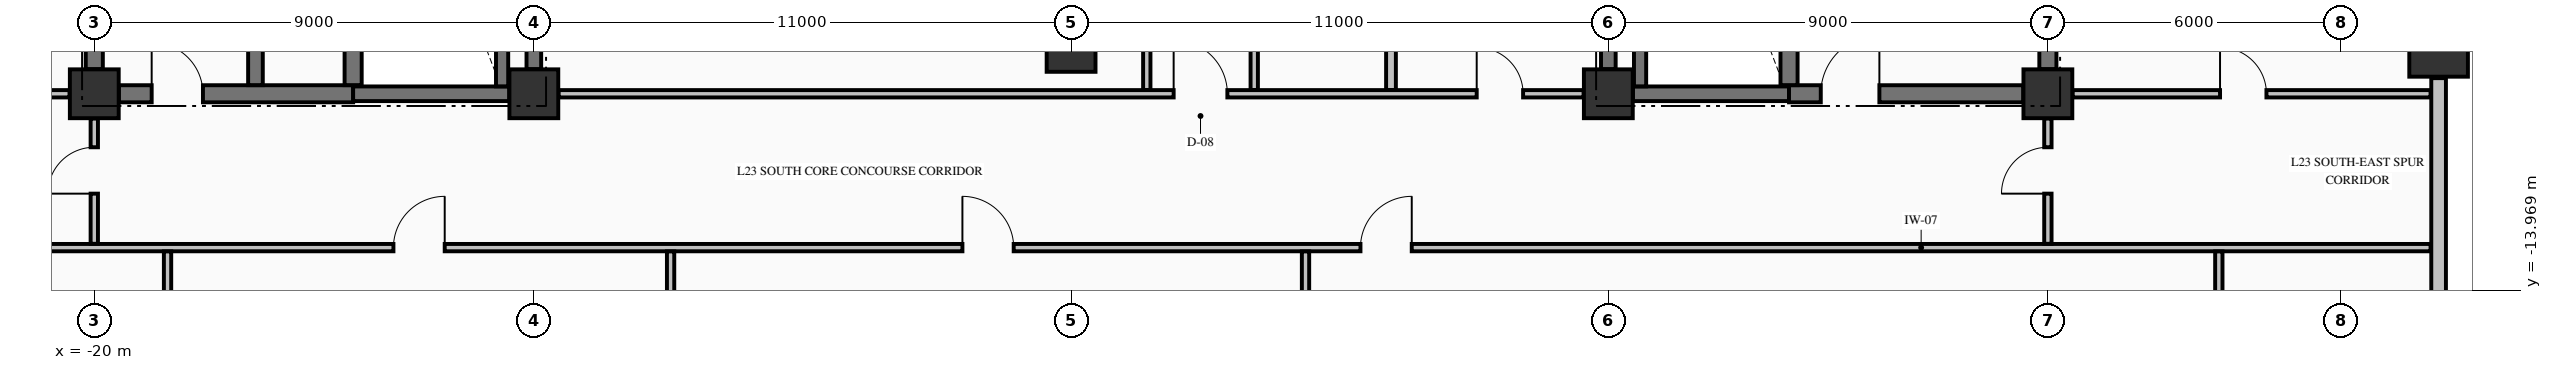
"""IFC4 building model, lengths in metres.
Left out: names, types, materials, properties, quantities, classifications, styles, units other than length and angle.
Written with IfcOpenShell. Run it as: python <this file> out.ifc"""

import sys

from ifc_helpers import new_model, si_unit, direction, frame, frame_2d, origin, origin_2d, place, context, subcontext, project, spatial, rectangle, extrude, element, fill, save


model = new_model("IFC4")
c1 = context("Model", 3, precision=1e-05, world=origin(), true_north=direction((0.0, 1.0)))
c2 = subcontext(c1, "Body", "Model", "MODEL_VIEW")
j1 = project(units=[si_unit("LENGTHUNIT", "METRE"), si_unit("PLANEANGLEUNIT", "RADIAN")], contexts=[c1])
p1 = place(None, origin())
s1 = spatial("IfcSite", under=j1, at=p1, CompositionType="ELEMENT")
p2 = place(p1, origin())
s2 = spatial("IfcBuilding", under=s1, at=p2, CompositionType="ELEMENT")
p3 = place(p2, frame((0.0, 0.0, 94.93)))
s3 = spatial("IfcBuildingStorey", under=s2, at=p3, CompositionType="ELEMENT", Elevation=94.93)
p4 = place(p3, frame((28.0, -9.0, -0.25), z_axis=(0.0, 0.0, 1.0), x_axis=(1.0, 0.0, 0.0)))
e1 = element("IfcColumn", 1, at=p4, inside=s3, PredefinedType="COLUMN", context=c2, shape_type="SweptSolid", body=[
    extrude(rectangle(XDim=1.2, YDim=1.2, at=origin_2d()), origin(), (0.0, 0.0, 1.0), 3.545),
])
for number, where, z_axis, x_axis in (
    (2, (-20.0, -9.95, -0.25), (0.0, 0.0, 1.0), (1.0, 0.0, 0.0)),
    (3, (-11.0, -9.95, -0.25), (0.0, 0.0, 1.0), (1.0, 0.0, 0.0)),
    (4, (11.0, -9.95, -0.25), (0.0, 0.0, 1.0), (1.0, 0.0, 0.0)),
    (5, (20.0, -9.95, -0.25), (0.0, 0.0, 1.0), (1.0, 0.0, 0.0)),
    (6, (0.0, -9.0, -0.25), (0.0, 0.0, 1.0), (1.0, 0.0, 0.0)),
):
    element("IfcColumn", number, at=place(p3, frame(where, z_axis=z_axis, x_axis=x_axis)), inside=s3, PredefinedType="COLUMN", context=c2, shape_type="SweptSolid", body=[
        extrude(rectangle(XDim=1.0, YDim=1.0, at=origin_2d()), origin(), (0.0, 0.0, 1.0), 3.545),
    ])
p5 = place(p3, frame((28.0, -20.37, 0.0), z_axis=(0.0, 0.0, 1.0), x_axis=(0.0, 1.0, 0.0)))
e7 = element("IfcWall", 7, at=p5, inside=s3, PredefinedType="STANDARD", context=c2, shape_type="SweptSolid", body=[
    extrude(rectangle(XDim=10.74, YDim=0.3, at=frame_2d((5.37, 0.0))), origin(), (0.0, 0.0, 1.0), 2.687),
])
p6 = place(p3, frame((-19.496, -9.95, 0.0), z_axis=(0.0, 0.0, 1.0), x_axis=(1.0, 0.0, 0.0)))
e8 = element("IfcWall", 8, at=p6, inside=s3, PredefinedType="SHEAR", context=c2, shape_type="SweptSolid", body=[
    extrude(rectangle(XDim=4.796, YDim=0.35, at=frame_2d((2.398, 0.0))), origin(), (0.0, 0.0, 1.0), 3.295),
])
p7 = place(p6, frame((0.671, 0.0, 0.0)))
e9 = element("IfcOpeningElement", 9, at=p7, cuts=e8, PredefinedType="OPENING", context=c2, shape_type="SweptSolid", body=[
    extrude(rectangle(XDim=1.05, YDim=2.15, at=frame_2d((0.525, 1.075))), frame((0.0, 0.185, 0.0), z_axis=(0.0, -1.0, 0.0), x_axis=(1.0, 0.0, 0.0)), (0.0, 0.0, 1.0), 0.37),
])
for number, where, z_axis, x_axis in (
    (10, (-14.7, -9.95, 0.0), (0.0, 0.0, 1.0), (1.0, 0.0, 0.0)),
    (11, (11.504, -9.95, 0.0), (0.0, 0.0, 1.0), (1.0, 0.0, 0.0)),
):
    element("IfcWall", number, at=place(p3, frame(where, z_axis=z_axis, x_axis=x_axis)), inside=s3, PredefinedType="SHEAR", context=c2, shape_type="SweptSolid", body=[
        extrude(rectangle(XDim=3.196, YDim=0.3, at=frame_2d((1.598, 0.0))), origin(), (0.0, 0.0, 1.0), 3.295),
    ])
p8 = place(p3, frame((14.7, -9.95, 0.0), z_axis=(0.0, 0.0, 1.0), x_axis=(1.0, 0.0, 0.0)))
e12 = element("IfcWall", 12, at=p8, inside=s3, PredefinedType="SHEAR", context=c2, shape_type="SweptSolid", body=[
    extrude(rectangle(XDim=4.796, YDim=0.35, at=frame_2d((2.398, 0.0))), origin(), (0.0, 0.0, 1.0), 3.295),
])
p9 = place(p8, frame((0.65, 0.0, 0.0)))
e13 = element("IfcOpeningElement", 13, at=p9, cuts=e12, PredefinedType="OPENING", context=c2, shape_type="SweptSolid", body=[
    extrude(rectangle(XDim=1.2, YDim=2.15, at=frame_2d((0.6, 1.075))), frame((0.0, 0.185, 0.0), z_axis=(0.0, -1.0, 0.0), x_axis=(1.0, 0.0, 0.0)), (0.0, 0.0, 1.0), 0.37),
])
p10 = place(p3, frame((-22.835, -13.1, 0.0), z_axis=(0.0, 0.0, 1.0), x_axis=(1.0, 0.0, 0.0)))
e14 = element("IfcWall", 14, at=p10, inside=s3, PredefinedType="PARTITIONING", context=c2, shape_type="SweptSolid", body=[
    extrude(rectangle(XDim=50.67, YDim=0.15, at=frame_2d((25.335, 0.0))), origin(), (0.0, 0.0, 1.0), 3.295),
])
p11 = place(p10, frame((8.96, 0.0, 0.0)))
e15 = element("IfcOpeningElement", 15, at=p11, cuts=e14, PredefinedType="OPENING", context=c2, shape_type="SweptSolid", body=[
    extrude(rectangle(XDim=1.05, YDim=2.15, at=frame_2d((0.525, 1.075))), frame((0.0, 0.085, 0.0), z_axis=(0.0, -1.0, 0.0), x_axis=(1.0, 0.0, 0.0)), (0.0, 0.0, 1.0), 0.17),
])
p12 = place(p10, frame((20.61, 0.0, 0.0)))
e16 = element("IfcOpeningElement", 16, at=p12, cuts=e14, PredefinedType="OPENING", context=c2, shape_type="SweptSolid", body=[
    extrude(rectangle(XDim=1.05, YDim=2.15, at=frame_2d((0.525, 1.075))), frame((0.0, 0.085, 0.0), z_axis=(0.0, -1.0, 0.0), x_axis=(1.0, 0.0, 0.0)), (0.0, 0.0, 1.0), 0.17),
])
p13 = place(p10, frame((28.76, 0.0, 0.0)))
e17 = element("IfcOpeningElement", 17, at=p13, cuts=e14, PredefinedType="OPENING", context=c2, shape_type="SweptSolid", body=[
    extrude(rectangle(XDim=1.05, YDim=2.15, at=frame_2d((0.525, 1.075))), frame((0.0, 0.085, 0.0), z_axis=(0.0, -1.0, 0.0), x_axis=(1.0, 0.0, 0.0)), (0.0, 0.0, 1.0), 0.17),
])
p14 = place(p3, frame((-22.835, -9.95, 0.0), z_axis=(0.0, 0.0, 1.0), x_axis=(1.0, 0.0, 0.0)))
e18 = element("IfcWall", 18, at=p14, inside=s3, PredefinedType="PARTITIONING", context=c2, shape_type="SweptSolid", body=[
    extrude(rectangle(XDim=2.329, YDim=0.15, at=frame_2d((1.165, 0.0))), origin(), (0.0, 0.0, 1.0), 3.295),
])
p15 = place(p14, frame((0.835, 0.0, 0.0)))
e19 = element("IfcOpeningElement", 19, at=p15, cuts=e18, PredefinedType="OPENING", context=c2, shape_type="SweptSolid", body=[
    extrude(rectangle(XDim=1.0, YDim=2.15, at=frame_2d((0.5, 1.075))), frame((0.0, 0.085, 0.0), z_axis=(0.0, -1.0, 0.0), x_axis=(1.0, 0.0, 0.0)), (0.0, 0.0, 1.0), 0.17),
])
p16 = place(p3, frame((-10.494, -9.95, 0.0), z_axis=(0.0, 0.0, 1.0), x_axis=(1.0, 0.0, 0.0)))
e20 = element("IfcWall", 20, at=p16, inside=s3, PredefinedType="PARTITIONING", context=c2, shape_type="SweptSolid", body=[
    extrude(rectangle(XDim=20.988, YDim=0.15, at=frame_2d((10.494, 0.0))), origin(), (0.0, 0.0, 1.0), 3.295),
])
p17 = place(p16, frame((12.594, 0.0, 0.0)))
e21 = element("IfcOpeningElement", 21, at=p17, cuts=e20, PredefinedType="OPENING", context=c2, shape_type="SweptSolid", body=[
    extrude(rectangle(XDim=1.1, YDim=2.15, at=frame_2d((0.55, 1.075))), frame((0.0, 0.085, 0.0), z_axis=(0.0, -1.0, 0.0), x_axis=(1.0, 0.0, 0.0)), (0.0, 0.0, 1.0), 0.17),
])
p18 = place(p16, frame((18.799, 0.0, 0.0)))
e22 = element("IfcOpeningElement", 22, at=p18, cuts=e20, PredefinedType="OPENING", context=c2, shape_type="SweptSolid", body=[
    extrude(rectangle(XDim=0.95, YDim=2.15, at=frame_2d((0.475, 1.075))), frame((0.0, 0.085, 0.0), z_axis=(0.0, -1.0, 0.0), x_axis=(1.0, 0.0, 0.0)), (0.0, 0.0, 1.0), 0.17),
])
p19 = place(p3, frame((20.506, -9.95, 0.0), z_axis=(0.0, 0.0, 1.0), x_axis=(1.0, 0.0, 0.0)))
e23 = element("IfcWall", 23, at=p19, inside=s3, PredefinedType="PARTITIONING", context=c2, shape_type="SweptSolid", body=[
    extrude(rectangle(XDim=7.329, YDim=0.15, at=frame_2d((3.665, 0.0))), origin(), (0.0, 0.0, 1.0), 3.295),
])
p20 = place(p19, frame((3.019, 0.0, 0.0)))
e24 = element("IfcOpeningElement", 24, at=p20, cuts=e23, PredefinedType="OPENING", context=c2, shape_type="SweptSolid", body=[
    extrude(rectangle(XDim=0.95, YDim=2.15, at=frame_2d((0.475, 1.075))), frame((0.0, 0.085, 0.0), z_axis=(0.0, -1.0, 0.0), x_axis=(1.0, 0.0, 0.0)), (0.0, 0.0, 1.0), 0.17),
])
p21 = place(p3, frame((-20.0, -9.446, 0.0), z_axis=(0.0, 0.0, 1.0), x_axis=(0.0, 1.0, 0.0)))
e25 = element("IfcWall", 25, at=p21, inside=s3, PredefinedType="SHEAR", context=c2, shape_type="SweptSolid", body=[
    extrude(rectangle(XDim=8.942, YDim=0.35, at=frame_2d((4.471, 0.0))), origin(), (0.0, 0.0, 1.0), 3.295),
])
p22 = place(p3, frame((-16.7, -9.773, 0.0), z_axis=(0.0, 0.0, 1.0), x_axis=(0.0, 1.0, 0.0)))
e26 = element("IfcWall", 26, at=p22, inside=s3, PredefinedType="SHEAR", context=c2, shape_type="SweptSolid", body=[
    extrude(rectangle(XDim=9.371, YDim=0.3, at=frame_2d((4.686, 0.0))), origin(), (0.0, 0.0, 1.0), 3.295),
])
p23 = place(p3, frame((-14.7, -9.773, 0.0), z_axis=(0.0, 0.0, 1.0), x_axis=(0.0, 1.0, 0.0)))
e27 = element("IfcWall", 27, at=p23, inside=s3, PredefinedType="SHEAR", context=c2, shape_type="SweptSolid", body=[
    extrude(rectangle(XDim=9.371, YDim=0.35, at=frame_2d((4.686, 0.0))), origin(), (0.0, 0.0, 1.0), 3.295),
])
p24 = place(p3, frame((-11.65, -9.798, 0.0), z_axis=(0.0, 0.0, 1.0), x_axis=(0.0, 1.0, 0.0)))
e28 = element("IfcWall", 28, at=p24, inside=s3, PredefinedType="SOLIDWALL", context=c2, shape_type="SweptSolid", body=[
    extrude(rectangle(XDim=9.396, YDim=0.25, at=frame_2d((4.698, 0.0))), origin(), (0.0, 0.0, 1.0), 3.295),
])
for number, where, z_axis, x_axis in (
    (29, (-11.0, -9.446, 0.0), (0.0, 0.0, 1.0), (0.0, 1.0, 0.0)),
    (30, (11.0, -9.446, 0.0), (0.0, 0.0, 1.0), (0.0, 1.0, 0.0)),
):
    element("IfcWall", number, at=place(p3, frame(where, z_axis=z_axis, x_axis=x_axis)), inside=s3, PredefinedType="SHEAR", context=c2, shape_type="SweptSolid", body=[
        extrude(rectangle(XDim=8.942, YDim=0.3, at=frame_2d((4.471, 0.0))), origin(), (0.0, 0.0, 1.0), 3.295),
    ])
p25 = place(p3, frame((11.65, -9.798, 0.0), z_axis=(0.0, 0.0, 1.0), x_axis=(0.0, 1.0, 0.0)))
e31 = element("IfcWall", 31, at=p25, inside=s3, PredefinedType="SOLIDWALL", context=c2, shape_type="SweptSolid", body=[
    extrude(rectangle(XDim=9.396, YDim=0.25, at=frame_2d((4.698, 0.0))), origin(), (0.0, 0.0, 1.0), 3.295),
])
p26 = place(p3, frame((14.7, -9.773, 0.0), z_axis=(0.0, 0.0, 1.0), x_axis=(0.0, 1.0, 0.0)))
e32 = element("IfcWall", 32, at=p26, inside=s3, PredefinedType="SHEAR", context=c2, shape_type="SweptSolid", body=[
    extrude(rectangle(XDim=9.371, YDim=0.35, at=frame_2d((4.686, 0.0))), origin(), (0.0, 0.0, 1.0), 3.295),
])
p27 = place(p3, frame((20.0, -9.446, 0.0), z_axis=(0.0, 0.0, 1.0), x_axis=(0.0, 1.0, 0.0)))
e33 = element("IfcWall", 33, at=p27, inside=s3, PredefinedType="SHEAR", context=c2, shape_type="SweptSolid", body=[
    extrude(rectangle(XDim=2.269, YDim=0.35, at=frame_2d((1.135, 0.0))), origin(), (0.0, 0.0, 1.0), 3.295),
])
p28 = place(p3, frame((-20.0, -13.022, 0.0), z_axis=(0.0, 0.0, 1.0), x_axis=(0.0, 1.0, 0.0)))
e34 = element("IfcWall", 34, at=p28, inside=s3, PredefinedType="PARTITIONING", context=c2, shape_type="SweptSolid", body=[
    extrude(rectangle(XDim=2.566, YDim=0.15, at=frame_2d((1.283, 0.0))), origin(), (0.0, 0.0, 1.0), 2.785),
])
p29 = place(p28, frame((1.027, 0.0, 0.0)))
e35 = element("IfcOpeningElement", 35, at=p29, cuts=e34, PredefinedType="OPENING", context=c2, shape_type="SweptSolid", body=[
    extrude(rectangle(XDim=0.95, YDim=2.15, at=frame_2d((0.475, 1.075))), frame((0.0, 0.085, 0.0), z_axis=(0.0, -1.0, 0.0), x_axis=(1.0, 0.0, 0.0)), (0.0, 0.0, 1.0), 0.17),
])
p30 = place(p3, frame((-18.5, -20.394, 0.0), z_axis=(0.0, 0.0, 1.0), x_axis=(0.0, 1.0, 0.0)))
e36 = element("IfcWall", 36, at=p30, inside=s3, PredefinedType="PARTITIONING", context=c2, shape_type="SweptSolid", body=[
    extrude(rectangle(XDim=7.216, YDim=0.15, at=frame_2d((3.608, 0.0))), origin(), (0.0, 0.0, 1.0), 3.295),
])
p31 = place(p3, frame((-8.2, -25.335, 0.0), z_axis=(0.0, 0.0, 1.0), x_axis=(0.0, 1.0, 0.0)))
e37 = element("IfcWall", 37, at=p31, inside=s3, PredefinedType="PARTITIONING", context=c2, shape_type="SweptSolid", body=[
    extrude(rectangle(XDim=12.157, YDim=0.15, at=frame_2d((6.079, 0.0))), origin(), (0.0, 0.0, 1.0), 3.295),
])
p32 = place(p3, frame((1.55, -9.872, 0.0), z_axis=(0.0, 0.0, 1.0), x_axis=(0.0, 1.0, 0.0)))
e38 = element("IfcWall", 38, at=p32, inside=s3, PredefinedType="PARTITIONING", context=c2, shape_type="SweptSolid", body=[
    extrude(rectangle(XDim=9.544, YDim=0.15, at=frame_2d((4.772, 0.0))), origin(), (0.0, 0.0, 1.0), 3.295),
])
p33 = place(p3, frame((3.75, -9.872, 0.0), z_axis=(0.0, 0.0, 1.0), x_axis=(0.0, 1.0, 0.0)))
e39 = element("IfcWall", 39, at=p33, inside=s3, PredefinedType="PARTITIONING", context=c2, shape_type="SweptSolid", body=[
    extrude(rectangle(XDim=5.519, YDim=0.15, at=frame_2d((2.76, 0.0))), origin(), (0.0, 0.0, 1.0), 3.295),
])
p34 = place(p33, frame((1.997, 0.0, 0.0)))
e40 = element("IfcOpeningElement", 40, at=p34, cuts=e39, PredefinedType="OPENING", context=c2, shape_type="SweptSolid", body=[
    extrude(rectangle(XDim=0.95, YDim=2.15, at=frame_2d((0.475, 1.075))), frame((0.0, 0.085, 0.0), z_axis=(0.0, -1.0, 0.0), x_axis=(1.0, 0.0, 0.0)), (0.0, 0.0, 1.0), 0.17),
])
p35 = place(p3, frame((4.8, -25.335, 0.0), z_axis=(0.0, 0.0, 1.0), x_axis=(0.0, 1.0, 0.0)))
e41 = element("IfcWall", 41, at=p35, inside=s3, PredefinedType="PARTITIONING", context=c2, shape_type="SweptSolid", body=[
    extrude(rectangle(XDim=12.157, YDim=0.15, at=frame_2d((6.079, 0.0))), origin(), (0.0, 0.0, 1.0), 3.295),
])
p36 = place(p3, frame((6.55, -9.872, 0.0), z_axis=(0.0, 0.0, 1.0), x_axis=(0.0, 1.0, 0.0)))
e42 = element("IfcWall", 42, at=p36, inside=s3, PredefinedType="PARTITIONING", context=c2, shape_type="SweptSolid", body=[
    extrude(rectangle(XDim=5.519, YDim=0.2, at=frame_2d((2.76, 0.0))), origin(), (0.0, 0.0, 1.0), 3.295),
])
p37 = place(p3, frame((20.0, -13.022, 0.0), z_axis=(0.0, 0.0, 1.0), x_axis=(0.0, 1.0, 0.0)))
e43 = element("IfcWall", 43, at=p37, inside=s3, PredefinedType="PARTITIONING", context=c2, shape_type="SweptSolid", body=[
    extrude(rectangle(XDim=2.566, YDim=0.15, at=frame_2d((1.283, 0.0))), origin(), (0.0, 0.0, 1.0), 2.785),
])
p38 = place(p37, frame((1.027, 0.0, 0.0)))
e44 = element("IfcOpeningElement", 44, at=p38, cuts=e43, PredefinedType="OPENING", context=c2, shape_type="SweptSolid", body=[
    extrude(rectangle(XDim=0.95, YDim=2.15, at=frame_2d((0.475, 1.075))), frame((0.0, 0.085, 0.0), z_axis=(0.0, -1.0, 0.0), x_axis=(1.0, 0.0, 0.0)), (0.0, 0.0, 1.0), 0.17),
])
p39 = place(p3, frame((23.5, -20.394, 0.0), z_axis=(0.0, 0.0, 1.0), x_axis=(0.0, 1.0, 0.0)))
e45 = element("IfcWall", 45, at=p39, inside=s3, PredefinedType="PARTITIONING", context=c2, shape_type="SweptSolid", body=[
    extrude(rectangle(XDim=7.216, YDim=0.15, at=frame_2d((3.608, 0.0))), origin(), (0.0, 0.0, 1.0), 3.295),
])
p40 = place(p7, origin())
e46 = element("IfcDoor", 46, at=p40, inside=s3, OperationType="SINGLE_SWING_LEFT", PredefinedType="DOOR", context=c2, shape_type="SweptSolid", body=[
    extrude(rectangle(XDim=1.05, YDim=2.15, at=frame_2d((0.525, 1.075))), frame((0.0, 0.025, 0.0), z_axis=(0.0, -1.0, 0.0), x_axis=(1.0, 0.0, 0.0)), (0.0, 0.0, 1.0), 0.05),
])
fill(e9, e46)
p41 = place(p9, origin())
e47 = element("IfcDoor", 47, at=p41, inside=s3, OperationType="SINGLE_SWING_RIGHT", PredefinedType="DOOR", context=c2, shape_type="SweptSolid", body=[
    extrude(rectangle(XDim=1.2, YDim=2.15, at=frame_2d((0.6, 1.075))), frame((0.0, 0.025, 0.0), z_axis=(0.0, -1.0, 0.0), x_axis=(1.0, 0.0, 0.0)), (0.0, 0.0, 1.0), 0.05),
])
fill(e13, e47)
p42 = place(p17, origin())
e48 = element("IfcDoor", 48, at=p42, inside=s3, OperationType="SINGLE_SWING_LEFT", PredefinedType="DOOR", context=c2, shape_type="SweptSolid", body=[
    extrude(rectangle(XDim=1.1, YDim=2.15, at=frame_2d((0.55, 1.075))), frame((0.0, 0.025, 0.0), z_axis=(0.0, -1.0, 0.0), x_axis=(1.0, 0.0, 0.0)), (0.0, 0.0, 1.0), 0.05),
])
fill(e21, e48)
p43 = place(p11, origin())
e49 = element("IfcDoor", 49, at=p43, inside=s3, OperationType="SINGLE_SWING_RIGHT", PredefinedType="DOOR", context=c2, shape_type="SweptSolid", body=[
    extrude(rectangle(XDim=1.05, YDim=2.15, at=frame_2d((0.525, 1.075))), frame((0.0, 0.025, 0.0), z_axis=(0.0, -1.0, 0.0), x_axis=(1.0, 0.0, 0.0)), (0.0, 0.0, 1.0), 0.05),
])
fill(e15, e49)
p44 = place(p12, origin())
e50 = element("IfcDoor", 50, at=p44, inside=s3, OperationType="SINGLE_SWING_LEFT", PredefinedType="DOOR", context=c2, shape_type="SweptSolid", body=[
    extrude(rectangle(XDim=1.05, YDim=2.15, at=frame_2d((0.525, 1.075))), frame((0.0, 0.025, 0.0), z_axis=(0.0, -1.0, 0.0), x_axis=(1.0, 0.0, 0.0)), (0.0, 0.0, 1.0), 0.05),
])
fill(e16, e50)
p45 = place(p13, origin())
e51 = element("IfcDoor", 51, at=p45, inside=s3, OperationType="SINGLE_SWING_RIGHT", PredefinedType="DOOR", context=c2, shape_type="SweptSolid", body=[
    extrude(rectangle(XDim=1.05, YDim=2.15, at=frame_2d((0.525, 1.075))), frame((0.0, 0.025, 0.0), z_axis=(0.0, -1.0, 0.0), x_axis=(1.0, 0.0, 0.0)), (0.0, 0.0, 1.0), 0.05),
])
fill(e17, e51)
p46 = place(p18, origin())
e52 = element("IfcDoor", 52, at=p46, inside=s3, OperationType="SINGLE_SWING_LEFT", PredefinedType="DOOR", context=c2, shape_type="SweptSolid", body=[
    extrude(rectangle(XDim=0.95, YDim=2.15, at=frame_2d((0.475, 1.075))), frame((0.0, 0.025, 0.0), z_axis=(0.0, -1.0, 0.0), x_axis=(1.0, 0.0, 0.0)), (0.0, 0.0, 1.0), 0.05),
])
fill(e22, e52)
p47 = place(p29, origin())
e53 = element("IfcDoor", 53, at=p47, inside=s3, OperationType="SINGLE_SWING_LEFT", PredefinedType="DOOR", context=c2, shape_type="SweptSolid", body=[
    extrude(rectangle(XDim=0.95, YDim=2.15, at=frame_2d((0.475, 1.075))), frame((0.0, 0.025, 0.0), z_axis=(0.0, -1.0, 0.0), x_axis=(1.0, 0.0, 0.0)), (0.0, 0.0, 1.0), 0.05),
])
fill(e35, e53)
p48 = place(p38, origin())
e54 = element("IfcDoor", 54, at=p48, inside=s3, OperationType="SINGLE_SWING_LEFT", PredefinedType="DOOR", context=c2, shape_type="SweptSolid", body=[
    extrude(rectangle(XDim=0.95, YDim=2.15, at=frame_2d((0.475, 1.075))), frame((0.0, 0.025, 0.0), z_axis=(0.0, -1.0, 0.0), x_axis=(1.0, 0.0, 0.0)), (0.0, 0.0, 1.0), 0.05),
])
fill(e44, e54)
p49 = place(p20, origin())
e55 = element("IfcDoor", 55, at=p49, inside=s3, OperationType="SINGLE_SWING_LEFT", PredefinedType="DOOR", context=c2, shape_type="SweptSolid", body=[
    extrude(rectangle(XDim=0.95, YDim=2.15, at=frame_2d((0.475, 1.075))), frame((0.0, 0.025, 0.0), z_axis=(0.0, -1.0, 0.0), x_axis=(1.0, 0.0, 0.0)), (0.0, 0.0, 1.0), 0.05),
])
fill(e24, e55)
save(model, sys.argv[1])
